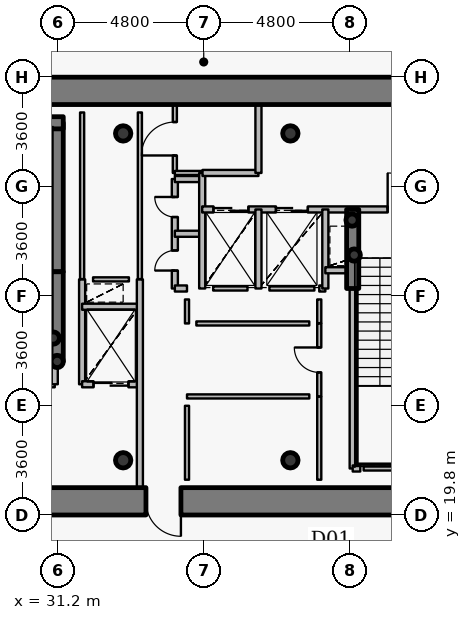
"""IFC4 building model, lengths in metres.
Left out: names, types, materials, properties, quantities, classifications, styles, units other than length and angle.
Written with IfcOpenShell. Run it as: python <this file> out.ifc"""

import sys

from ifc_helpers import new_model, si_unit, direction, frame, frame_2d, origin, origin_2d, place, context, subcontext, project, spatial, rectangle, hollow_circle, extrude, source, transform, mapped, element, fill, save


model = new_model("IFC4")
c1 = context("Model", 3, precision=1e-05, world=origin(), true_north=direction((0.0, 1.0)))
c2 = subcontext(c1, "Body", "Model", "MODEL_VIEW")
j1 = project(units=[si_unit("LENGTHUNIT", "METRE"), si_unit("PLANEANGLEUNIT", "RADIAN")], contexts=[c1])
p1 = place(None, origin())
s1 = spatial("IfcSite", under=j1, at=p1, CompositionType="ELEMENT")
p2 = place(p1, origin())
s2 = spatial("IfcBuilding", under=s1, at=p2, CompositionType="ELEMENT")
p3 = place(p2, frame((0.0, 0.0, -4.5)))
s3 = spatial("IfcBuildingStorey", under=s2, at=p3, CompositionType="ELEMENT", Elevation=-4.5)
for number, where, z_axis, x_axis in (
    (1, (33.35, 21.6, 0.0), (0.0, 0.0, 1.0), (1.0, 0.0, 0.0)),
    (2, (38.85, 21.6, 0.0), (0.0, 0.0, 1.0), (1.0, 0.0, 0.0)),
    (3, (38.85, 32.35, 0.0), (0.0, 0.0, 1.0), (1.0, 0.0, 0.0)),
    (4, (33.35, 32.35, 0.0), (0.0, 0.0, 1.0), (1.0, 0.0, 0.0)),
):
    element("IfcColumn", number, at=place(p3, frame(where, z_axis=z_axis, x_axis=x_axis)), inside=s3, PredefinedType="COLUMN", context=c2, shape_type="SweptSolid", body=[
        extrude(hollow_circle(Radius=0.254, WallThickness=0.02, at=origin_2d()), origin(), (0.0, 0.0, 1.0), 4.5),
    ])
p4 = place(p3, frame((31.18, 27.8, 0.0), z_axis=(0.0, 0.0, 1.0), x_axis=(0.0, 1.0, 0.0)))
e5 = element("IfcWall", 5, at=p4, inside=s3, PredefinedType="SHEAR", context=c2, shape_type="SweptSolid", body=[
    extrude(rectangle(XDim=4.9, YDim=0.4, at=frame_2d((2.45, 0.0))), origin(), (0.0, 0.0, 1.0), 4.5),
])
p5 = place(p3, frame((27.28, 32.7, 0.0), z_axis=(0.0, 0.0, 1.0), x_axis=(1.0, 0.0, 0.0)))
e6 = element("IfcWall", 6, at=p5, inside=s3, PredefinedType="SHEAR", context=c2, shape_type="SweptSolid", body=[
    extrude(rectangle(XDim=4.1, YDim=0.4, at=frame_2d((2.05, 0.0))), origin(), (0.0, 0.0, 1.0), 4.5),
])
for number, where, z_axis, x_axis in (
    (7, (31.05, 25.62, 0.0), (0.0, 0.0, 1.0), (1.0, 0.0, 0.0)),
    (8, (31.18, 24.85, 0.0), (0.0, 0.0, 1.0), (1.0, 0.0, 0.0)),
    (9, (40.95, 28.35, 0.0), (0.0, 0.0, 1.0), (1.0, 0.0, 0.0)),
    (10, (40.88, 29.5, 0.0), (0.0, 0.0, 1.0), (1.0, 0.0, 0.0)),
):
    element("IfcColumn", number, at=place(p3, frame(where, z_axis=z_axis, x_axis=x_axis)), inside=s3, PredefinedType="COLUMN", context=c2, shape_type="SweptSolid", body=[
        extrude(hollow_circle(Radius=0.203, WallThickness=0.016, at=origin_2d()), origin(), (0.0, 0.0, 1.0), 4.5),
    ])
p6 = place(p3, frame((26.75, 33.75, 0.0), z_axis=(0.0, 0.0, 1.0), x_axis=(1.0, 0.0, 0.0)))
e11 = element("IfcWall", 11, at=p6, inside=s3, PredefinedType="SHEAR", context=c2, shape_type="SweptSolid", body=[
    extrude(rectangle(XDim=18.5, YDim=0.9, at=frame_2d((9.25, 0.0))), origin(), (0.0, 0.0, 1.0), 3.65),
])
p7 = place(p3, frame((45.25, 20.25, 0.0), z_axis=(0.0, 0.0, 1.0), x_axis=(-1.0, 0.0, 0.0)))
e12 = element("IfcWall", 12, at=p7, inside=s3, PredefinedType="SHEAR", context=c2, shape_type="SweptSolid", body=[
    extrude(rectangle(XDim=18.5, YDim=0.9, at=frame_2d((9.25, 0.0))), origin(), (0.0, 0.0, 1.0), 3.65),
])
p8 = place(p7, frame((10.0, 0.0, 0.0)))
e13 = element("IfcOpeningElement", 13, at=p8, cuts=e12, PredefinedType="OPENING", context=c2, shape_type="SweptSolid", body=[
    extrude(rectangle(XDim=1.15, YDim=2.15, at=origin_2d()), frame((0.575, 0.46, 1.075), z_axis=(0.0, -1.0, 0.0), x_axis=(1.0, 0.0, 0.0)), (0.0, 0.0, 1.0), 0.92),
])
p9 = place(p3, frame((31.18, 24.85, 0.0), z_axis=(0.0, 0.0, 1.0), x_axis=(0.0, 1.0, 0.0)))
e14 = element("IfcWall", 14, at=p9, inside=s3, PredefinedType="SHEAR", context=c2, shape_type="SweptSolid", body=[
    extrude(rectangle(XDim=2.95, YDim=0.4, at=frame_2d((1.475, 0.0))), origin(), (0.0, 0.0, 1.0), 3.8),
])
p10 = place(p3, frame((40.9, 27.25, 0.0), z_axis=(0.0, 0.0, 1.0), x_axis=(0.0, 1.0, 0.0)))
e15 = element("IfcWall", 15, at=p10, inside=s3, PredefinedType="SHEAR", context=c2, shape_type="SweptSolid", body=[
    extrude(rectangle(XDim=2.6, YDim=0.4, at=frame_2d((1.3, 0.0))), origin(), (0.0, 0.0, 1.0), 3.8),
])
p11 = place(p3, frame((27.56, 24.1, 0.0), z_axis=(0.0, 0.0, 1.0), x_axis=(1.0, 0.0, 0.0)))
e16 = element("IfcWall", 16, at=p11, inside=s3, PredefinedType="PARTITIONING", context=c2, shape_type="SweptSolid", body=[
    extrude(rectangle(XDim=3.54, YDim=0.2, at=frame_2d((1.77, 0.0))), origin(), (0.0, 0.0, 1.0), 4.2),
])
p12 = place(p11, frame((1.17, 0.0, 0.0)))
e17 = element("IfcOpeningElement", 17, at=p12, cuts=e16, PredefinedType="OPENING", context=c2, shape_type="SweptSolid", body=[
    extrude(rectangle(XDim=1.2, YDim=2.15, at=origin_2d()), frame((0.6, 0.11, 1.075), z_axis=(0.0, -1.0, 0.0), x_axis=(1.0, 0.0, 0.0)), (0.0, 0.0, 1.0), 0.22),
])
p13 = place(p3, frame((31.1, 24.1, 0.0), z_axis=(0.0, 0.0, 1.0), x_axis=(0.0, 1.0, 0.0)))
e18 = element("IfcWall", 18, at=p13, inside=s3, PredefinedType="PARTITIONING", context=c2, shape_type="SweptSolid", body=[
    extrude(rectangle(XDim=0.74, YDim=0.2, at=frame_2d((0.37, 0.0))), origin(), (0.0, 0.0, 1.0), 4.2),
])
p14 = place(p3, frame((32.0, 24.1, 0.0), z_axis=(0.0, 0.0, 1.0), x_axis=(0.0, 1.0, 0.0)))
e19 = element("IfcWall", 19, at=p14, inside=s3, PredefinedType="PARTITIONING", context=c2, shape_type="SweptSolid", body=[
    extrude(rectangle(XDim=3.45, YDim=0.2, at=frame_2d((1.725, 0.0))), origin(), (0.0, 0.0, 1.0), 4.2),
])
p15 = place(p3, frame((32.0, 24.1, 0.0), z_axis=(0.0, 0.0, 1.0), x_axis=(1.0, 0.0, 0.0)))
e20 = element("IfcWall", 20, at=p15, inside=s3, PredefinedType="PARTITIONING", context=c2, shape_type="SweptSolid", body=[
    extrude(rectangle(XDim=1.9, YDim=0.2, at=frame_2d((0.95, 0.0))), origin(), (0.0, 0.0, 1.0), 3.785),
])
p16 = place(p15, frame((0.375, 0.0, 0.0)))
e21 = element("IfcOpeningElement", 21, at=p16, cuts=e20, PredefinedType="OPENING", context=c2, shape_type="SweptSolid", body=[
    extrude(rectangle(XDim=1.15, YDim=2.15, at=origin_2d()), frame((0.575, 0.11, 1.075), z_axis=(0.0, -1.0, 0.0), x_axis=(1.0, 0.0, 0.0)), (0.0, 0.0, 1.0), 0.22),
])
p17 = place(p3, frame((32.0, 26.65, 0.0), z_axis=(0.0, 0.0, 1.0), x_axis=(1.0, 0.0, 0.0)))
e22 = element("IfcWall", 22, at=p17, inside=s3, PredefinedType="PARTITIONING", context=c2, shape_type="SweptSolid", body=[
    extrude(rectangle(XDim=1.9, YDim=0.2, at=frame_2d((0.95, 0.0))), origin(), (0.0, 0.0, 1.0), 3.785),
])
p18 = place(p3, frame((33.9, 20.7, 0.0), z_axis=(0.0, 0.0, 1.0), x_axis=(0.0, 1.0, 0.0)))
e23 = element("IfcWall", 23, at=p18, inside=s3, PredefinedType="PARTITIONING", context=c2, shape_type="SweptSolid", body=[
    extrude(rectangle(XDim=6.85, YDim=0.2, at=frame_2d((3.425, 0.0))), origin(), (0.0, 0.0, 1.0), 3.785),
])
p19 = place(p3, frame((35.05, 27.25, 0.0), z_axis=(0.0, 0.0, 1.0), x_axis=(0.0, 1.0, 0.0)))
e24 = element("IfcWall", 24, at=p19, inside=s3, PredefinedType="PARTITIONING", context=c2, shape_type="SweptSolid", body=[
    extrude(rectangle(XDim=3.6, YDim=0.2, at=frame_2d((1.8, 0.0))), origin(), (0.0, 0.0, 1.0), 4.2),
])
p20 = place(p19, frame((0.59, 0.0, 0.0)))
e25 = element("IfcOpeningElement", 25, at=p20, cuts=e24, PredefinedType="OPENING", context=c2, shape_type="SweptSolid", body=[
    extrude(rectangle(XDim=0.66, YDim=2.05, at=origin_2d()), frame((0.33, 0.11, 1.025), z_axis=(0.0, -1.0, 0.0), x_axis=(1.0, 0.0, 0.0)), (0.0, 0.0, 1.0), 0.22),
])
p21 = place(p19, frame((2.35, 0.0, 0.0)))
e26 = element("IfcOpeningElement", 26, at=p21, cuts=e24, PredefinedType="OPENING", context=c2, shape_type="SweptSolid", body=[
    extrude(rectangle(XDim=0.66, YDim=2.05, at=origin_2d()), frame((0.33, 0.11, 1.025), z_axis=(0.0, -1.0, 0.0), x_axis=(1.0, 0.0, 0.0)), (0.0, 0.0, 1.0), 0.22),
])
p22 = place(p3, frame((35.05, 27.25, 0.0), z_axis=(0.0, 0.0, 1.0), x_axis=(1.0, 0.0, 0.0)))
e27 = element("IfcWall", 27, at=p22, inside=s3, PredefinedType="PARTITIONING", context=c2, shape_type="SweptSolid", body=[
    extrude(rectangle(XDim=0.4, YDim=0.2, at=frame_2d((0.2, 0.0))), origin(), (0.0, 0.0, 1.0), 4.2),
])
for number, where, z_axis, x_axis in (
    (28, (35.05, 29.05, 0.0), (0.0, 0.0, 1.0), (1.0, 0.0, 0.0)),
    (29, (35.05, 30.85, 0.0), (0.0, 0.0, 1.0), (1.0, 0.0, 0.0)),
):
    element("IfcWall", number, at=place(p3, frame(where, z_axis=z_axis, x_axis=x_axis)), inside=s3, PredefinedType="PARTITIONING", context=c2, shape_type="SweptSolid", body=[
        extrude(rectangle(XDim=0.9, YDim=0.2, at=frame_2d((0.45, 0.0))), origin(), (0.0, 0.0, 1.0), 4.2),
    ])
p23 = place(p3, frame((35.05, 31.05, 0.0), z_axis=(0.0, 0.0, 1.0), x_axis=(0.0, 1.0, 0.0)))
e30 = element("IfcWall", 30, at=p23, inside=s3, PredefinedType="PARTITIONING", context=c2, shape_type="SweptSolid", body=[
    extrude(rectangle(XDim=2.25, YDim=0.135, at=frame_2d((1.125, 0.0))), origin(), (0.0, 0.0, 1.0), 3.785),
])
p24 = place(p23, frame((0.575, 0.0, 0.0)))
e31 = element("IfcOpeningElement", 31, at=p24, cuts=e30, PredefinedType="OPENING", context=c2, shape_type="SweptSolid", body=[
    extrude(rectangle(XDim=1.1, YDim=2.15, at=origin_2d()), frame((0.55, 0.078, 1.075), z_axis=(0.0, -1.0, 0.0), x_axis=(1.0, 0.0, 0.0)), (0.0, 0.0, 1.0), 0.155),
])
p25 = place(p3, frame((35.05, 31.05, 0.0), z_axis=(0.0, 0.0, 1.0), x_axis=(1.0, 0.0, 0.0)))
e32 = element("IfcWall", 32, at=p25, inside=s3, PredefinedType="PARTITIONING", context=c2, shape_type="SweptSolid", body=[
    extrude(rectangle(XDim=0.9, YDim=0.135, at=frame_2d((0.45, 0.0))), origin(), (0.0, 0.0, 1.0), 4.2),
])
p26 = place(p3, frame((35.95, 27.25, 0.0), z_axis=(0.0, 0.0, 1.0), x_axis=(0.0, 1.0, 0.0)))
e33 = element("IfcWall", 33, at=p26, inside=s3, PredefinedType="PARTITIONING", context=c2, shape_type="SweptSolid", body=[
    extrude(rectangle(XDim=3.8, YDim=0.2, at=frame_2d((1.9, 0.0))), origin(), (0.0, 0.0, 1.0), 4.2),
])
p27 = place(p3, frame((35.95, 29.85, 0.0), z_axis=(0.0, 0.0, 1.0), x_axis=(1.0, 0.0, 0.0)))
e34 = element("IfcWall", 34, at=p27, inside=s3, PredefinedType="PARTITIONING", context=c2, shape_type="SweptSolid", body=[
    extrude(rectangle(XDim=8.49, YDim=0.2, at=frame_2d((4.245, 0.0))), origin(), (0.0, 0.0, 1.0), 3.785),
])
p28 = place(p27, frame((6.1, 0.0, 0.0)))
e35 = element("IfcOpeningElement", 35, at=p28, cuts=e34, PredefinedType="OPENING", context=c2, shape_type="SweptSolid", body=[
    extrude(rectangle(XDim=1.2, YDim=2.15, at=origin_2d()), frame((0.6, 0.11, 1.075), z_axis=(0.0, -1.0, 0.0), x_axis=(1.0, 0.0, 0.0)), (0.0, 0.0, 1.0), 0.22),
])
p29 = place(p27, frame((0.37, 0.0, 0.0)))
e36 = element("IfcOpeningElement", 36, at=p29, cuts=e34, PredefinedType="OPENING", context=c2, shape_type="SweptSolid", body=[
    extrude(rectangle(XDim=1.15, YDim=2.15, at=origin_2d()), frame((0.575, 0.11, 1.075), z_axis=(0.0, -1.0, 0.0), x_axis=(1.0, 0.0, 0.0)), (0.0, 0.0, 1.0), 0.22),
])
p30 = place(p27, frame((2.425, 0.0, 0.0)))
e37 = element("IfcOpeningElement", 37, at=p30, cuts=e34, PredefinedType="OPENING", context=c2, shape_type="SweptSolid", body=[
    extrude(rectangle(XDim=1.05, YDim=2.15, at=origin_2d()), frame((0.525, 0.11, 1.075), z_axis=(0.0, -1.0, 0.0), x_axis=(1.0, 0.0, 0.0)), (0.0, 0.0, 1.0), 0.22),
])
p31 = place(p3, frame((35.96, 31.05, 0.0), z_axis=(0.0, 0.0, 1.0), x_axis=(1.0, 0.0, 0.0)))
e38 = element("IfcWall", 38, at=p31, inside=s3, PredefinedType="PARTITIONING", context=c2, shape_type="SweptSolid", body=[
    extrude(rectangle(XDim=1.84, YDim=0.2, at=frame_2d((0.92, 0.0))), origin(), (0.0, 0.0, 1.0), 4.2),
])
p32 = place(p3, frame((37.8, 27.25, 0.0), z_axis=(0.0, 0.0, 1.0), x_axis=(0.0, 1.0, 0.0)))
e39 = element("IfcWall", 39, at=p32, inside=s3, PredefinedType="PARTITIONING", context=c2, shape_type="SweptSolid", body=[
    extrude(rectangle(XDim=2.6, YDim=0.2, at=frame_2d((1.3, 0.0))), origin(), (0.0, 0.0, 1.0), 4.2),
])
p33 = place(p3, frame((37.8, 31.05, 0.0), z_axis=(0.0, 0.0, 1.0), x_axis=(0.0, 1.0, 0.0)))
e40 = element("IfcWall", 40, at=p33, inside=s3, PredefinedType="PARTITIONING", context=c2, shape_type="SweptSolid", body=[
    extrude(rectangle(XDim=2.25, YDim=0.2, at=frame_2d((1.125, 0.0))), origin(), (0.0, 0.0, 1.0), 3.785),
])
p34 = place(p3, frame((39.8, 23.7, 0.0), z_axis=(0.0, 0.0, 1.0), x_axis=(0.0, 1.0, 0.0)))
e41 = element("IfcWall", 41, at=p34, inside=s3, PredefinedType="PARTITIONING", context=c2, shape_type="SweptSolid", body=[
    extrude(rectangle(XDim=2.4, YDim=0.135, at=frame_2d((1.2, 0.0))), origin(), (0.0, 0.0, 1.0), 4.2),
])
p35 = place(p34, frame((0.79, 0.0, 0.0)))
e42 = element("IfcOpeningElement", 42, at=p35, cuts=e41, PredefinedType="OPENING", context=c2, shape_type="SweptSolid", body=[
    extrude(rectangle(XDim=0.82, YDim=2.1, at=origin_2d()), frame((0.41, 0.078, 1.05), z_axis=(0.0, -1.0, 0.0), x_axis=(1.0, 0.0, 0.0)), (0.0, 0.0, 1.0), 0.155),
])
p36 = place(p3, frame((39.8, 27.25, 0.0), z_axis=(0.0, 0.0, 1.0), x_axis=(1.0, 0.0, 0.0)))
e43 = element("IfcWall", 43, at=p36, inside=s3, PredefinedType="PARTITIONING", context=c2, shape_type="SweptSolid", body=[
    extrude(rectangle(XDim=0.2, YDim=0.2, at=frame_2d((0.1, 0.0))), origin(), (0.0, 0.0, 1.0), 4.2),
])
p37 = place(p3, frame((40.0, 27.25, 0.0), z_axis=(0.0, 0.0, 1.0), x_axis=(0.0, 1.0, 0.0)))
e44 = element("IfcWall", 44, at=p37, inside=s3, PredefinedType="PARTITIONING", context=c2, shape_type="SweptSolid", body=[
    extrude(rectangle(XDim=2.6, YDim=0.2, at=frame_2d((1.3, 0.0))), origin(), (0.0, 0.0, 1.0), 4.2),
])
p38 = place(p3, frame((40.0, 27.85, 0.0), z_axis=(0.0, 0.0, 1.0), x_axis=(1.0, 0.0, 0.0)))
e45 = element("IfcWall", 45, at=p38, inside=s3, PredefinedType="PARTITIONING", context=c2, shape_type="SweptSolid", body=[
    extrude(rectangle(XDim=0.9, YDim=0.2, at=frame_2d((0.45, 0.0))), origin(), (0.0, 0.0, 1.0), 4.2),
])
p39 = place(p3, frame((40.9, 21.33, 0.0), z_axis=(0.0, 0.0, 1.0), x_axis=(0.0, 1.0, 0.0)))
e46 = element("IfcWall", 46, at=p39, inside=s3, PredefinedType="PARTITIONING", context=c2, shape_type="SweptSolid", body=[
    extrude(rectangle(XDim=5.91, YDim=0.2, at=frame_2d((2.955, 0.0))), origin(), (0.0, 0.0, 1.0), 3.735),
])
p40 = place(p3, frame((40.9, 21.33, 0.0), z_axis=(0.0, 0.0, 1.0), x_axis=(1.0, 0.0, 0.0)))
e47 = element("IfcWall", 47, at=p40, inside=s3, PredefinedType="PARTITIONING", context=c2, shape_type="SweptSolid", body=[
    extrude(rectangle(XDim=0.25, YDim=0.2, at=frame_2d((0.125, 0.0))), origin(), (0.0, 0.0, 1.0), 3.735),
])
p41 = place(p3, frame((44.08, 21.33, 0.0), z_axis=(0.0, 0.0, 1.0), x_axis=(-1.0, 0.0, 0.0)))
e48 = element("IfcWall", 48, at=p41, inside=s3, PredefinedType="PARTITIONING", context=c2, shape_type="SweptSolid", body=[
    extrude(rectangle(XDim=2.82, YDim=0.135, at=frame_2d((1.41, 0.0))), origin(), (0.0, 0.0, 1.0), 3.735),
])
p42 = place(p3, frame((37.44, 27.25, 0.0), z_axis=(0.0, 0.0, 1.0), x_axis=(-1.0, 0.0, 0.0)))
e49 = element("IfcWall", 49, at=p42, inside=s3, PredefinedType="PARTITIONING", context=c2, shape_type="SweptSolid", body=[
    extrude(rectangle(XDim=1.13, YDim=0.135, at=frame_2d((0.565, 0.0))), origin(), (0.0, 0.0, 1.0), 4.2),
])
p43 = place(p3, frame((39.64, 27.25, 0.0), z_axis=(0.0, 0.0, 1.0), x_axis=(-1.0, 0.0, 0.0)))
e50 = element("IfcWall", 50, at=p43, inside=s3, PredefinedType="PARTITIONING", context=c2, shape_type="SweptSolid", body=[
    extrude(rectangle(XDim=1.48, YDim=0.135, at=frame_2d((0.74, 0.0))), origin(), (0.0, 0.0, 1.0), 3.785),
])
p44 = place(p3, frame((32.36, 27.55, 0.0), z_axis=(0.0, 0.0, 1.0), x_axis=(1.0, 0.0, 0.0)))
e51 = element("IfcWall", 51, at=p44, inside=s3, PredefinedType="PARTITIONING", context=c2, shape_type="SweptSolid", body=[
    extrude(rectangle(XDim=1.18, YDim=0.135, at=frame_2d((0.59, 0.0))), origin(), (0.0, 0.0, 1.0), 3.785),
])
p45 = place(p3, frame((39.8, 20.96, 0.0), z_axis=(0.0, 0.0, 1.0), x_axis=(0.0, 1.0, 0.0)))
e52 = element("IfcWall", 52, at=p45, inside=s3, PredefinedType="PARTITIONING", context=c2, shape_type="SweptSolid", body=[
    extrude(rectangle(XDim=2.73, YDim=0.135, at=frame_2d((1.365, 0.0))), origin(), (0.0, 0.0, 1.0), 3.735),
])
p46 = place(p3, frame((39.8, 26.11, 0.0), z_axis=(0.0, 0.0, 1.0), x_axis=(0.0, 1.0, 0.0)))
e53 = element("IfcWall", 53, at=p46, inside=s3, PredefinedType="PARTITIONING", context=c2, shape_type="SweptSolid", body=[
    extrude(rectangle(XDim=0.78, YDim=0.135, at=frame_2d((0.39, 0.0))), origin(), (0.0, 0.0, 1.0), 4.2),
])
p47 = place(p3, frame((32.0, 33.04, 0.0), z_axis=(0.0, 0.0, 1.0), x_axis=(0.0, -1.0, 0.0)))
e54 = element("IfcWall", 54, at=p47, inside=s3, PredefinedType="PARTITIONING", context=c2, shape_type="SweptSolid", body=[
    extrude(rectangle(XDim=5.48, YDim=0.135, at=frame_2d((2.74, 0.0))), origin(), (0.0, 0.0, 1.0), 3.735),
])
p48 = place(p3, frame((35.45, 26.89, 0.0), z_axis=(0.0, 0.0, 1.0), x_axis=(0.0, -1.0, 0.0)))
e55 = element("IfcWall", 55, at=p48, inside=s3, PredefinedType="PARTITIONING", context=c2, shape_type="SweptSolid", body=[
    extrude(rectangle(XDim=0.79, YDim=0.135, at=frame_2d((0.395, 0.0))), origin(), (0.0, 0.0, 1.0), 4.2),
])
p49 = place(p3, frame((35.758, 26.1, 0.0), z_axis=(0.0, 0.0, 1.0), x_axis=(1.0, 0.0, 0.0)))
e56 = element("IfcWall", 56, at=p49, inside=s3, PredefinedType="PARTITIONING", context=c2, shape_type="SweptSolid", body=[
    extrude(rectangle(XDim=3.715, YDim=0.135, at=frame_2d((1.857, 0.0))), origin(), (0.0, 0.0, 1.0), 3.785),
])
p50 = place(p3, frame((39.472, 23.7, 0.0), z_axis=(0.0, 0.0, 1.0), x_axis=(-1.0, 0.0, 0.0)))
e57 = element("IfcWall", 57, at=p50, inside=s3, PredefinedType="PARTITIONING", context=c2, shape_type="SweptSolid", body=[
    extrude(rectangle(XDim=4.022, YDim=0.135, at=frame_2d((2.011, 0.0))), origin(), (0.0, 0.0, 1.0), 3.785),
])
p51 = place(p3, frame((35.45, 23.393, 0.0), z_axis=(0.0, 0.0, 1.0), x_axis=(0.0, -1.0, 0.0)))
e58 = element("IfcWall", 58, at=p51, inside=s3, PredefinedType="PARTITIONING", context=c2, shape_type="SweptSolid", body=[
    extrude(rectangle(XDim=2.433, YDim=0.135, at=frame_2d((1.216, 0.0))), origin(), (0.0, 0.0, 1.0), 3.785),
])
p52 = place(p3, frame((33.9, 27.56, 0.0), z_axis=(0.0, 0.0, 1.0), x_axis=(0.0, 1.0, 0.0)))
e59 = element("IfcWall", 59, at=p52, inside=s3, PredefinedType="PARTITIONING", context=c2, shape_type="SweptSolid", body=[
    extrude(rectangle(XDim=5.48, YDim=0.135, at=frame_2d((2.74, 0.0))), origin(), (0.0, 0.0, 1.0), 3.785),
])
m1 = source(origin(), c2, "Body", "SweptSolid", [
    extrude(rectangle(XDim=1.15, YDim=2.15, at=origin_2d()), frame((0.575, 0.025, 1.075), z_axis=(0.0, -1.0, 0.0), x_axis=(1.0, 0.0, 0.0)), (0.0, 0.0, 1.0), 0.05),
])
p53 = place(p8, origin())
e60 = element("IfcDoor", 60, at=p53, inside=s3, OperationType="SINGLE_SWING_LEFT", PredefinedType="DOOR", context=c2, shape_type="MappedRepresentation", body=[
    mapped(m1, transform((0.0, 0.0, 0.0), x_axis=(1.0, 0.0, 0.0), y_axis=(0.0, 1.0, 0.0), z_axis=(0.0, 0.0, 1.0), scale=1.0)),
])
fill(e13, e60)
m2 = source(origin(), c2, "Body", "SweptSolid", [
    extrude(rectangle(XDim=1.2, YDim=2.15, at=origin_2d()), frame((0.6, 0.025, 1.075), z_axis=(0.0, -1.0, 0.0), x_axis=(1.0, 0.0, 0.0)), (0.0, 0.0, 1.0), 0.05),
])
p54 = place(p28, origin())
e61 = element("IfcDoor", 61, at=p54, inside=s3, OperationType="SINGLE_SWING_LEFT", PredefinedType="DOOR", context=c2, shape_type="MappedRepresentation", body=[
    mapped(m2, transform((0.0, 0.0, 0.0), x_axis=(1.0, 0.0, 0.0), y_axis=(0.0, 1.0, 0.0), z_axis=(0.0, 0.0, 1.0), scale=1.0)),
])
fill(e35, e61)
m3 = source(origin(), c2, "Body", "SweptSolid", [
    extrude(rectangle(XDim=1.15, YDim=2.15, at=origin_2d()), frame((0.575, 0.025, 1.075), z_axis=(0.0, -1.0, 0.0), x_axis=(1.0, 0.0, 0.0)), (0.0, 0.0, 1.0), 0.05),
])
p55 = place(p29, origin())
e62 = element("IfcDoor", 62, at=p55, inside=s3, OperationType="DOUBLE_DOOR_SLIDING", PredefinedType="USERDEFINED", context=c2, shape_type="MappedRepresentation", body=[
    mapped(m3, transform((0.0, 0.0, 0.0), x_axis=(1.0, 0.0, 0.0), y_axis=(0.0, 1.0, 0.0), z_axis=(0.0, 0.0, 1.0), scale=1.0)),
])
fill(e36, e62)
p56 = place(p16, origin())
e63 = element("IfcDoor", 63, at=p56, inside=s3, OperationType="DOUBLE_DOOR_SLIDING", PredefinedType="USERDEFINED", context=c2, shape_type="MappedRepresentation", body=[
    mapped(m3, transform((0.0, 0.0, 0.0), x_axis=(1.0, 0.0, 0.0), y_axis=(0.0, 1.0, 0.0), z_axis=(0.0, 0.0, 1.0), scale=1.0)),
])
fill(e21, e63)
m4 = source(origin(), c2, "Body", "SweptSolid", [
    extrude(rectangle(XDim=1.05, YDim=2.15, at=origin_2d()), frame((0.525, 0.025, 1.075), z_axis=(0.0, -1.0, 0.0), x_axis=(1.0, 0.0, 0.0)), (0.0, 0.0, 1.0), 0.05),
])
p57 = place(p30, origin())
e64 = element("IfcDoor", 64, at=p57, inside=s3, OperationType="DOUBLE_DOOR_SLIDING", PredefinedType="USERDEFINED", context=c2, shape_type="MappedRepresentation", body=[
    mapped(m4, transform((0.0, 0.0, 0.0), x_axis=(1.0, 0.0, 0.0), y_axis=(0.0, 1.0, 0.0), z_axis=(0.0, 0.0, 1.0), scale=1.0)),
])
fill(e37, e64)
m5 = source(origin(), c2, "Body", "SweptSolid", [
    extrude(rectangle(XDim=0.66, YDim=2.05, at=origin_2d()), frame((0.33, 0.025, 1.025), z_axis=(0.0, -1.0, 0.0), x_axis=(1.0, 0.0, 0.0)), (0.0, 0.0, 1.0), 0.05),
])
p58 = place(p20, origin())
e65 = element("IfcDoor", 65, at=p58, inside=s3, OperationType="SINGLE_SWING_LEFT", PredefinedType="USERDEFINED", context=c2, shape_type="MappedRepresentation", body=[
    mapped(m5, transform((0.0, 0.0, 0.0), x_axis=(1.0, 0.0, 0.0), y_axis=(0.0, 1.0, 0.0), z_axis=(0.0, 0.0, 1.0), scale=1.0)),
])
fill(e25, e65)
p59 = place(p21, origin())
e66 = element("IfcDoor", 66, at=p59, inside=s3, OperationType="SINGLE_SWING_RIGHT", PredefinedType="USERDEFINED", context=c2, shape_type="MappedRepresentation", body=[
    mapped(m5, transform((0.0, 0.0, 0.0), x_axis=(1.0, 0.0, 0.0), y_axis=(0.0, 1.0, 0.0), z_axis=(0.0, 0.0, 1.0), scale=1.0)),
])
fill(e26, e66)
m6 = source(origin(), c2, "Body", "SweptSolid", [
    extrude(rectangle(XDim=1.1, YDim=2.15, at=origin_2d()), frame((0.55, 0.025, 1.075), z_axis=(0.0, -1.0, 0.0), x_axis=(1.0, 0.0, 0.0)), (0.0, 0.0, 1.0), 0.05),
])
p60 = place(p24, origin())
e67 = element("IfcDoor", 67, at=p60, inside=s3, OperationType="SINGLE_SWING_LEFT", PredefinedType="DOOR", context=c2, shape_type="MappedRepresentation", body=[
    mapped(m6, transform((0.0, 0.0, 0.0), x_axis=(1.0, 0.0, 0.0), y_axis=(0.0, 1.0, 0.0), z_axis=(0.0, 0.0, 1.0), scale=1.0)),
])
fill(e31, e67)
m7 = source(origin(), c2, "Body", "SweptSolid", [
    extrude(rectangle(XDim=0.82, YDim=2.1, at=origin_2d()), frame((0.41, 0.025, 1.05), z_axis=(0.0, -1.0, 0.0), x_axis=(1.0, 0.0, 0.0)), (0.0, 0.0, 1.0), 0.05),
])
p61 = place(p35, origin())
e68 = element("IfcDoor", 68, at=p61, inside=s3, OperationType="SINGLE_SWING_RIGHT", PredefinedType="DOOR", context=c2, shape_type="MappedRepresentation", body=[
    mapped(m7, transform((0.0, 0.0, 0.0), x_axis=(1.0, 0.0, 0.0), y_axis=(0.0, 1.0, 0.0), z_axis=(0.0, 0.0, 1.0), scale=1.0)),
])
fill(e42, e68)
save(model, sys.argv[1])
